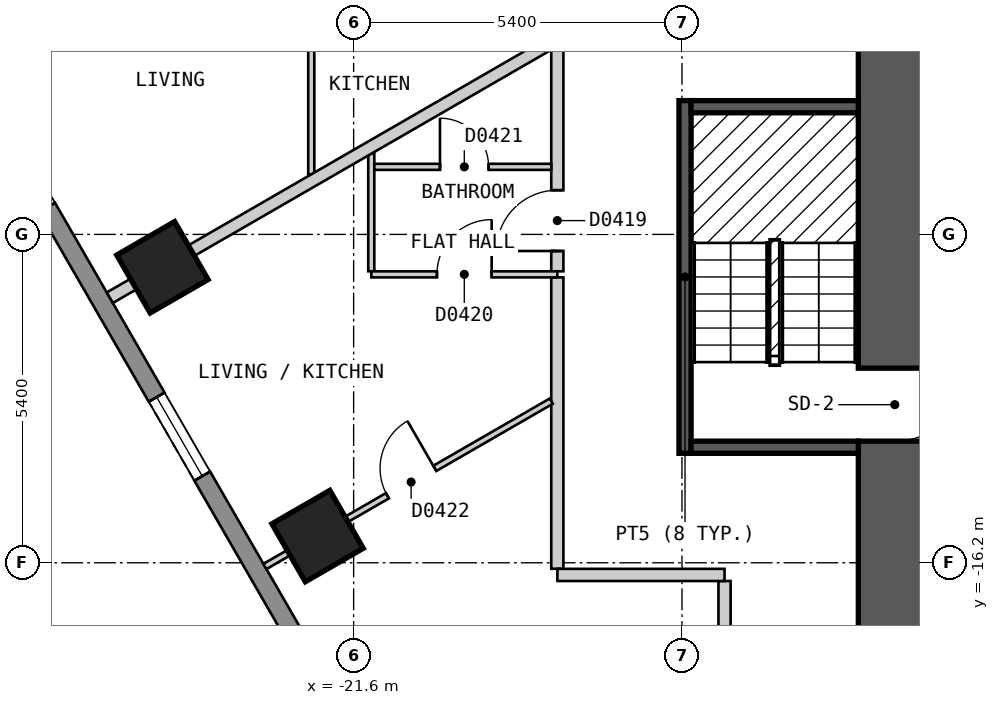
"""IFC4 building model, lengths in metres.
Left out: names, types, materials, properties, quantities, classifications, styles, units other than length and angle.
Written with IfcOpenShell. Run it as: python <this file> out.ifc"""

import sys

from ifc_helpers import new_model, si_unit, direction, frame, frame_2d, origin, origin_2d, place, context, subcontext, project, spatial, polyline, rectangle, outline, extrude, element, fill, save


model = new_model("IFC4")
c1 = context("Model", 3, precision=1e-05, world=origin(), true_north=direction((0.0, 1.0)))
c2 = subcontext(c1, "Body", "Model", "MODEL_VIEW")
j1 = project(units=[si_unit("LENGTHUNIT", "METRE"), si_unit("PLANEANGLEUNIT", "RADIAN")], contexts=[c1])
p1 = place(None, origin())
s1 = spatial("IfcSite", under=j1, at=p1, CompositionType="ELEMENT")
p2 = place(p1, origin())
s2 = spatial("IfcBuilding", under=s1, at=p2, CompositionType="ELEMENT")
p3 = place(p2, frame((0.0, 0.0, 38.4)))
s3 = spatial("IfcBuildingStorey", under=s2, at=p3, CompositionType="ELEMENT", Elevation=38.4)
for number, where, z_axis, x_axis in (
    (1, (-24.745, -11.341, 0.0), (0.0, 0.0, 1.0), (0.5, -0.866, 0.0)),
    (2, (-22.193, -15.761, 0.0), (0.0, 0.0, 1.0), (0.5, -0.866, 0.0)),
):
    element("IfcColumn", number, at=place(p3, frame(where, z_axis=z_axis, x_axis=x_axis)), inside=s3, PredefinedType="COLUMN", context=c2, shape_type="SweptSolid", body=[
        extrude(rectangle(XDim=1.1, YDim=1.1, at=origin_2d()), origin(), (0.0, 0.0, 1.0), 3.0),
    ])
p4 = place(p3, frame((-12.7, -17.8, 0.0), z_axis=(0.0, 0.0, 1.0), x_axis=(0.0, 1.0, 0.0)))
e3 = element("IfcWall", 3, at=p4, inside=s3, PredefinedType="SHEAR", context=c2, shape_type="SweptSolid", body=[
    extrude(rectangle(XDim=11.6, YDim=1.2, at=frame_2d((5.8, 0.0))), origin(), (0.0, 0.0, 1.0), 2.7),
])
p5 = place(p4, frame((3.6, 0.0, 0.0)))
e4 = element("IfcOpeningElement", 4, at=p5, cuts=e3, PredefinedType="OPENING", context=c2, shape_type="SweptSolid", body=[
    extrude(rectangle(XDim=1.2, YDim=2.1, at=frame_2d((0.6, 1.05))), frame((0.0, 0.61, 0.0), z_axis=(0.0, -1.0, 0.0), x_axis=(1.0, 0.0, 0.0)), (0.0, 0.0, 1.0), 1.22),
])
p6 = place(p3, frame((-31.22, -2.425, 0.0), z_axis=(0.0, 0.0, 1.0), x_axis=(0.500001938803, -0.866024284413, 0.0)))
e5 = element("IfcWall", 5, at=p6, inside=s3, PredefinedType="SOLIDWALL", context=c2, shape_type="SweptSolid", body=[
    extrude(outline(polyline([(0.0, -0.15), (27.02, -0.15), (26.94, 0.15), (0.08, 0.15), (0.0, -0.15)])), origin(), (0.0, 0.0, 1.0), 2.7),
])
p7 = place(p6, frame((2.553, 0.0, 0.15)))
e6 = element("IfcOpeningElement", 6, at=p7, cuts=e5, PredefinedType="OPENING", context=c2, shape_type="SweptSolid", body=[
    extrude(rectangle(XDim=1.5, YDim=2.1, at=frame_2d((0.75, 1.05))), frame((0.0, 0.16, 0.0), z_axis=(0.0, -1.0, 0.0), x_axis=(1.0, 0.0, 0.0)), (0.0, 0.0, 1.0), 0.32),
])
p8 = place(p6, frame((7.657, 0.0, 0.15)))
e7 = element("IfcOpeningElement", 7, at=p8, cuts=e5, PredefinedType="OPENING", context=c2, shape_type="SweptSolid", body=[
    extrude(rectangle(XDim=1.5, YDim=2.1, at=frame_2d((0.75, 1.05))), frame((0.0, 0.16, 0.0), z_axis=(0.0, -1.0, 0.0), x_axis=(1.0, 0.0, 0.0)), (0.0, 0.0, 1.0), 0.32),
])
p9 = place(p6, frame((12.761, 0.0, 0.15)))
e8 = element("IfcOpeningElement", 8, at=p9, cuts=e5, PredefinedType="OPENING", context=c2, shape_type="SweptSolid", body=[
    extrude(rectangle(XDim=1.5, YDim=2.1, at=frame_2d((0.75, 1.05))), frame((0.0, 0.16, 0.0), z_axis=(0.0, -1.0, 0.0), x_axis=(1.0, 0.0, 0.0)), (0.0, 0.0, 1.0), 0.32),
])
p10 = place(p6, frame((17.865, 0.0, 0.15)))
e9 = element("IfcOpeningElement", 9, at=p10, cuts=e5, PredefinedType="OPENING", context=c2, shape_type="SweptSolid", body=[
    extrude(rectangle(XDim=1.5, YDim=2.1, at=frame_2d((0.75, 1.05))), frame((0.0, 0.16, 0.0), z_axis=(0.0, -1.0, 0.0), x_axis=(1.0, 0.0, 0.0)), (0.0, 0.0, 1.0), 0.32),
])
p11 = place(p6, frame((22.969, 0.0, 0.15)))
e10 = element("IfcOpeningElement", 10, at=p11, cuts=e5, PredefinedType="OPENING", context=c2, shape_type="SweptSolid", body=[
    extrude(rectangle(XDim=1.5, YDim=2.1, at=frame_2d((0.75, 1.05))), frame((0.0, 0.16, 0.0), z_axis=(0.0, -1.0, 0.0), x_axis=(1.0, 0.0, 0.0)), (0.0, 0.0, 1.0), 0.32),
])
p12 = place(p3, frame((-15.5, -16.5, 0.0), z_axis=(0.0, 0.0, 1.0), x_axis=(0.0, -1.0, 0.0)))
e11 = element("IfcWall", 11, at=p12, inside=s3, PredefinedType="PARTITIONING", context=c2, shape_type="SweptSolid", body=[
    extrude(rectangle(XDim=4.599, YDim=0.2, at=frame_2d((2.3, 0.0))), origin(), (0.0, 0.0, 1.0), 2.7),
])
p13 = place(p3, frame((-18.25, -11.507, 0.0), z_axis=(0.0, 0.0, 1.0), x_axis=(0.0, -1.0, 0.0)))
e12 = element("IfcWall", 12, at=p13, inside=s3, PredefinedType="PARTITIONING", context=c2, shape_type="SweptSolid", body=[
    extrude(rectangle(XDim=4.792, YDim=0.2, at=frame_2d((2.396, 0.0))), origin(), (0.0, 0.0, 1.0), 2.7),
])
p14 = place(p3, frame((-18.249, -16.4, 0.0), z_axis=(0.0, 0.0, 1.0), x_axis=(1.0, 0.0, 0.0)))
e13 = element("IfcWall", 13, at=p14, inside=s3, PredefinedType="PARTITIONING", context=c2, shape_type="SweptSolid", body=[
    extrude(rectangle(XDim=2.749, YDim=0.2, at=frame_2d((1.375, 0.0))), origin(), (0.0, 0.0, 1.0), 2.7),
])
p15 = place(p3, frame((-18.25, -11.407, 0.0), z_axis=(0.0, 0.0, 1.0), x_axis=(0.0, 1.0, 0.0)))
e14 = element("IfcWall", 14, at=p15, inside=s3, PredefinedType="PARTITIONING", context=c2, shape_type="SweptSolid", body=[
    extrude(rectangle(XDim=3.665, YDim=0.2, at=frame_2d((1.833, 0.0))), origin(), (0.0, 0.0, 1.0), 2.7),
])
p16 = place(p15, frame((0.334, 0.0, 0.0)))
e15 = element("IfcOpeningElement", 15, at=p16, cuts=e14, PredefinedType="OPENING", context=c2, shape_type="SweptSolid", body=[
    extrude(rectangle(XDim=1.0, YDim=2.1, at=frame_2d((0.5, 1.05))), frame((0.0, 0.11, 0.0), z_axis=(0.0, -1.0, 0.0), x_axis=(1.0, 0.0, 0.0)), (0.0, 0.0, 1.0), 0.22),
])
p17 = place(p3, frame((-21.31, -9.474, 0.0), z_axis=(0.0, 0.0, 1.0), x_axis=(0.0, -1.0, 0.0)))
e16 = element("IfcWall", 16, at=p17, inside=s3, PredefinedType="PARTITIONING", context=c2, shape_type="SweptSolid", body=[
    extrude(rectangle(XDim=1.932, YDim=0.1, at=frame_2d((0.966, 0.0))), origin(), (0.0, 0.0, 1.0), 2.7),
])
p18 = place(p3, frame((-21.26, -9.689, 0.0), z_axis=(0.0, 0.0, 1.0), x_axis=(1.0, 0.0, 0.0)))
e17 = element("IfcWall", 17, at=p18, inside=s3, PredefinedType="PARTITIONING", context=c2, shape_type="SweptSolid", body=[
    extrude(rectangle(XDim=2.91, YDim=0.1, at=frame_2d((1.455, 0.0))), origin(), (0.0, 0.0, 1.0), 2.7),
])
p19 = place(p18, frame((1.08, 0.0, 0.0)))
e18 = element("IfcOpeningElement", 18, at=p19, cuts=e17, PredefinedType="OPENING", context=c2, shape_type="SweptSolid", body=[
    extrude(rectangle(XDim=0.8, YDim=2.1, at=frame_2d((0.4, 1.05))), frame((0.0, 0.06, 0.0), z_axis=(0.0, -1.0, 0.0), x_axis=(1.0, 0.0, 0.0)), (0.0, 0.0, 1.0), 0.12),
])
p20 = place(p3, frame((-21.309, -11.457, 0.0), z_axis=(0.0, 0.0, 1.0), x_axis=(1.0, 0.0, 0.0)))
e19 = element("IfcWall", 19, at=p20, inside=s3, PredefinedType="PARTITIONING", context=c2, shape_type="SweptSolid", body=[
    extrude(rectangle(XDim=3.059, YDim=0.1, at=frame_2d((1.53, 0.0))), origin(), (0.0, 0.0, 1.0), 2.7),
])
p21 = place(p20, frame((1.079, 0.0, 0.0)))
e20 = element("IfcOpeningElement", 20, at=p21, cuts=e19, PredefinedType="OPENING", context=c2, shape_type="SweptSolid", body=[
    extrude(rectangle(XDim=0.9, YDim=2.1, at=frame_2d((0.45, 1.05))), frame((0.0, 0.06, 0.0), z_axis=(0.0, -1.0, 0.0), x_axis=(1.0, 0.0, 0.0)), (0.0, 0.0, 1.0), 0.12),
])
p22 = place(p3, frame((-22.297, -9.813, 0.0), z_axis=(0.0, 0.0, 1.0), x_axis=(0.0, 1.0, 0.0)))
e21 = element("IfcWall", 21, at=p22, inside=s3, PredefinedType="PARTITIONING", context=c2, shape_type="SweptSolid", body=[
    extrude(rectangle(XDim=4.338, YDim=0.1, at=frame_2d((2.169, 0.0))), origin(), (0.0, 0.0, 1.0), 2.7),
])
p23 = place(p22, frame((2.818, 0.0, 0.0)))
e22 = element("IfcOpeningElement", 22, at=p23, cuts=e21, PredefinedType="OPENING", context=c2, shape_type="SweptSolid", body=[
    extrude(rectangle(XDim=0.9, YDim=2.1, at=frame_2d((0.45, 1.05))), frame((0.0, 0.06, 0.0), z_axis=(0.0, -1.0, 0.0), x_axis=(1.0, 0.0, 0.0)), (0.0, 0.0, 1.0), 0.12),
])
p24 = place(p3, frame((-23.059, -16.261, 0.0), z_axis=(0.0, 0.0, 1.0), x_axis=(0.866004639177, 0.500035963631, 0.0)))
e23 = element("IfcWall", 23, at=p24, inside=s3, PredefinedType="PARTITIONING", context=c2, shape_type="SweptSolid", body=[
    extrude(rectangle(XDim=5.438, YDim=0.1, at=frame_2d((2.719, 0.0))), origin(), (0.0, 0.0, 1.0), 2.7),
])
p25 = place(p24, frame((2.326, 0.0, 0.0)))
e24 = element("IfcOpeningElement", 24, at=p25, cuts=e23, PredefinedType="OPENING", context=c2, shape_type="SweptSolid", body=[
    extrude(rectangle(XDim=0.9, YDim=2.1, at=frame_2d((0.45, 1.05))), frame((0.0, 0.06, 0.0), z_axis=(0.0, -1.0, 0.0), x_axis=(1.0, 0.0, 0.0)), (0.0, 0.0, 1.0), 0.12),
])
p26 = place(p3, frame((-25.61, -11.841, 0.0), z_axis=(0.0, 0.0, 1.0), x_axis=(0.866019023803, 0.500011050288, 0.0)))
e25 = element("IfcWall", 25, at=p26, inside=s3, PredefinedType="PARTITIONING", context=c2, shape_type="SweptSolid", body=[
    extrude(rectangle(XDim=8.47, YDim=0.2, at=frame_2d((4.235, 0.0))), origin(), (0.0, 0.0, 1.0), 2.7),
])
p27 = place(p3, frame((-16.15, -14.4, 0.0), z_axis=(0.0, 0.0, 1.0), x_axis=(0.0, 1.0, 0.0)))
e26 = element("IfcWall", 26, at=p27, inside=s3, PredefinedType="SOLIDWALL", context=c2, shape_type="SweptSolid", body=[
    extrude(rectangle(XDim=5.8, YDim=0.2, at=frame_2d((2.9, 0.0))), origin(), (0.0, 0.0, 1.0), 2.7),
])
for number, where, z_axis, x_axis in (
    (27, (-16.05, -14.3, 0.0), (0.0, 0.0, 1.0), (1.0, 0.0, 0.0)),
    (28, (-16.05, -8.7, 0.0), (0.0, 0.0, 1.0), (1.0, 0.0, 0.0)),
):
    element("IfcWall", number, at=place(p3, frame(where, z_axis=z_axis, x_axis=x_axis)), inside=s3, PredefinedType="SOLIDWALL", context=c2, shape_type="SweptSolid", body=[
        extrude(rectangle(XDim=2.75, YDim=0.2, at=frame_2d((1.375, 0.0))), origin(), (0.0, 0.0, 1.0), 2.7),
    ])
p28 = place(p9, origin())
e29 = element("IfcWindow", 29, at=p28, inside=s3, PartitioningType="SINGLE_PANEL", PredefinedType="WINDOW", context=c2, shape_type="SweptSolid", body=[
    extrude(rectangle(XDim=1.5, YDim=2.1, at=frame_2d((0.75, 1.05))), frame((0.0, 0.03, 0.0), z_axis=(0.0, -1.0, 0.0), x_axis=(1.0, 0.0, 0.0)), (0.0, 0.0, 1.0), 0.06),
])
fill(e8, e29)
p29 = place(p16, origin())
e30 = element("IfcDoor", 30, at=p29, inside=s3, OperationType="SINGLE_SWING_LEFT", PredefinedType="DOOR", context=c2, shape_type="SweptSolid", body=[
    extrude(rectangle(XDim=1.0, YDim=2.1, at=frame_2d((0.5, 1.05))), frame((0.0, 0.025, 0.0), z_axis=(0.0, -1.0, 0.0), x_axis=(1.0, 0.0, 0.0)), (0.0, 0.0, 1.0), 0.05),
])
fill(e15, e30)
p30 = place(p21, origin())
e31 = element("IfcDoor", 31, at=p30, inside=s3, OperationType="SINGLE_SWING_RIGHT", PredefinedType="DOOR", context=c2, shape_type="SweptSolid", body=[
    extrude(rectangle(XDim=0.9, YDim=2.1, at=frame_2d((0.45, 1.05))), frame((0.0, 0.025, 0.0), z_axis=(0.0, -1.0, 0.0), x_axis=(1.0, 0.0, 0.0)), (0.0, 0.0, 1.0), 0.05),
])
fill(e20, e31)
p31 = place(p19, origin())
e32 = element("IfcDoor", 32, at=p31, inside=s3, OperationType="SINGLE_SWING_LEFT", PredefinedType="DOOR", context=c2, shape_type="SweptSolid", body=[
    extrude(rectangle(XDim=0.8, YDim=2.1, at=frame_2d((0.4, 1.05))), frame((0.0, 0.025, 0.0), z_axis=(0.0, -1.0, 0.0), x_axis=(1.0, 0.0, 0.0)), (0.0, 0.0, 1.0), 0.05),
])
fill(e18, e32)
p32 = place(p25, origin())
e33 = element("IfcDoor", 33, at=p32, inside=s3, OperationType="SINGLE_SWING_RIGHT", PredefinedType="DOOR", context=c2, shape_type="SweptSolid", body=[
    extrude(rectangle(XDim=0.9, YDim=2.1, at=frame_2d((0.45, 1.05))), frame((0.0, 0.025, 0.0), z_axis=(0.0, -1.0, 0.0), x_axis=(1.0, 0.0, 0.0)), (0.0, 0.0, 1.0), 0.05),
])
fill(e24, e33)
p33 = place(p5, origin())
e34 = element("IfcDoor", 34, at=p33, inside=s3, OperationType="SINGLE_SWING_RIGHT", PredefinedType="DOOR", context=c2, shape_type="SweptSolid", body=[
    extrude(rectangle(XDim=1.2, YDim=2.1, at=frame_2d((0.6, 1.05))), frame((0.0, 0.025, 0.0), z_axis=(0.0, -1.0, 0.0), x_axis=(1.0, 0.0, 0.0)), (0.0, 0.0, 1.0), 0.05),
])
fill(e4, e34)
save(model, sys.argv[1])
